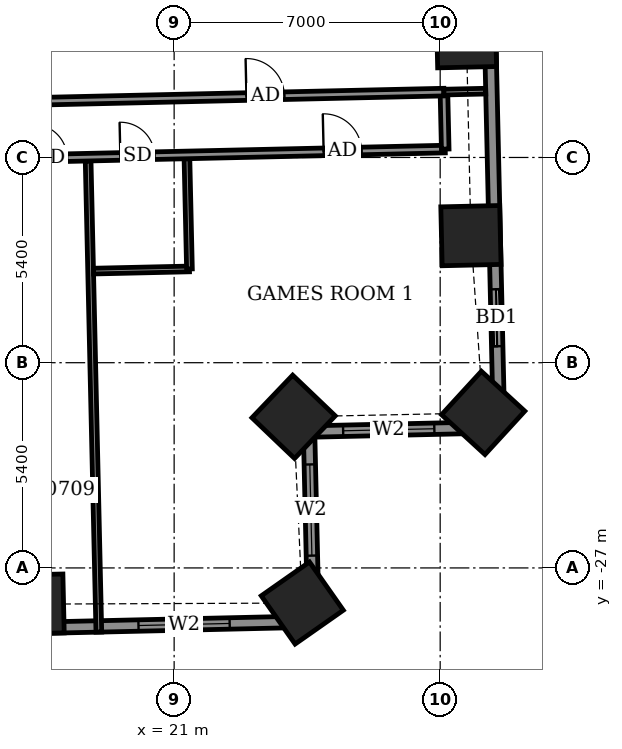
"""IFC4 building model, lengths in metres.
Left out: names, types, materials, properties, quantities, classifications, styles, units other than length and angle.
Written with IfcOpenShell. Run it as: python <this file> out.ifc"""

import sys

from ifc_helpers import new_model, si_unit, direction, frame, frame_2d, origin, origin_2d, place, context, subcontext, project, spatial, rectangle, extrude, element, fill, save


model = new_model("IFC4")
c1 = context("Model", 3, precision=1e-05, world=origin(), true_north=direction((0.0, 1.0)))
c2 = subcontext(c1, "Body", "Model", "MODEL_VIEW")
j1 = project(units=[si_unit("LENGTHUNIT", "METRE"), si_unit("PLANEANGLEUNIT", "RADIAN")], contexts=[c1])
p1 = place(None, origin())
s1 = spatial("IfcSite", under=j1, at=p1, CompositionType="ELEMENT")
p2 = place(p1, origin())
s2 = spatial("IfcBuilding", under=s1, at=p2, CompositionType="ELEMENT")
p3 = place(p2, frame((0.0, 0.0, 34.1)))
s3 = spatial("IfcBuildingStorey", under=s2, at=p3, CompositionType="ELEMENT", Elevation=34.1)
for number, where, z_axis, x_axis in (
    (1, (17.315, -27.952, -0.55), (0.0, 0.0, 1.0), (1.0, 0.023, 0.0)),
    (2, (24.372, -27.923, -0.55), (0.0, 0.0, 1.0), (0.819, 0.574, 0.0)),
    (3, (24.144, -23.024, -0.55), (0.0, 0.0, 1.0), (0.691, 0.723, 0.0)),
    (4, (29.132, -22.921, -0.55), (0.0, 0.0, 1.0), (0.676, 0.737, 0.0)),
    (5, (28.809, -18.257, -0.55), (0.0, 0.0, 1.0), (-0.023, 1.0, 0.0)),
    (6, (28.691, -13.05, -0.55), (0.0, 0.0, 1.0), (-0.023, 1.0, 0.0)),
):
    element("IfcColumn", number, at=place(p3, frame(where, z_axis=z_axis, x_axis=x_axis)), inside=s3, PredefinedType="COLUMN", context=c2, shape_type="SweptSolid", body=[
        extrude(rectangle(XDim=1.55, YDim=1.55, at=origin_2d()), origin(), (0.0, 0.0, 1.0), 3.6),
    ])
p4 = place(p3, frame((29.549, -23.299, 0.0), z_axis=(0.0, 0.0, 1.0), x_axis=(-0.022670336976, 0.999742994885, 0.0)))
e7 = element("IfcWall", 7, at=p4, inside=s3, PredefinedType="SOLIDWALL", context=c2, shape_type="SweptSolid", body=[
    extrude(rectangle(XDim=15.529, YDim=0.3, at=frame_2d((7.765, 0.0))), origin(), (0.0, 0.0, 1.0), 3.05),
])
p5 = place(p4, frame((2.133, 0.0, 0.0)))
e8 = element("IfcOpeningElement", 8, at=p5, cuts=e7, PredefinedType="OPENING", context=c2, shape_type="SweptSolid", body=[
    extrude(rectangle(XDim=1.5, YDim=2.4, at=frame_2d((0.75, 1.2))), frame((0.0, 0.16, 0.0), z_axis=(0.0, -1.0, 0.0), x_axis=(1.0, 0.0, 0.0)), (0.0, 0.0, 1.0), 0.32),
])
p6 = place(p4, frame((11.67, 0.0, 0.9)))
e9 = element("IfcOpeningElement", 9, at=p6, cuts=e7, PredefinedType="OPENING", context=c2, shape_type="SweptSolid", body=[
    extrude(rectangle(XDim=2.4, YDim=1.5, at=frame_2d((1.2, 0.75))), frame((0.0, 0.16, 0.0), z_axis=(0.0, -1.0, 0.0), x_axis=(1.0, 0.0, 0.0)), (0.0, 0.0, 1.0), 0.32),
])
p7 = place(p3, frame((-27.423, -29.593, 0.0), z_axis=(0.0, 0.0, 1.0), x_axis=(0.999742563204, 0.022689365739, 0.0)))
e10 = element("IfcWall", 10, at=p7, inside=s3, PredefinedType="SOLIDWALL", context=c2, shape_type="SweptSolid", body=[
    extrude(rectangle(XDim=52.101, YDim=0.3, at=frame_2d((26.05, 0.0))), origin(), (0.0, 0.0, 1.0), 3.05),
])
p8 = place(p7, frame((2.517, 0.0, 0.0)))
e11 = element("IfcOpeningElement", 11, at=p8, cuts=e10, PredefinedType="OPENING", context=c2, shape_type="SweptSolid", body=[
    extrude(rectangle(XDim=1.5, YDim=2.4, at=frame_2d((0.75, 1.2))), frame((0.0, 0.16, 0.0), z_axis=(0.0, -1.0, 0.0), x_axis=(1.0, 0.0, 0.0)), (0.0, 0.0, 1.0), 0.32),
])
p9 = place(p7, frame((8.356, 0.0, 0.0)))
e12 = element("IfcOpeningElement", 12, at=p9, cuts=e10, PredefinedType="OPENING", context=c2, shape_type="SweptSolid", body=[
    extrude(rectangle(XDim=1.2, YDim=2.4, at=frame_2d((0.6, 1.2))), frame((0.0, 0.16, 0.0), z_axis=(0.0, -1.0, 0.0), x_axis=(1.0, 0.0, 0.0)), (0.0, 0.0, 1.0), 0.32),
])
p10 = place(p7, frame((11.423, 0.0, 0.0)))
e13 = element("IfcOpeningElement", 13, at=p10, cuts=e10, PredefinedType="OPENING", context=c2, shape_type="SweptSolid", body=[
    extrude(rectangle(XDim=1.5, YDim=2.4, at=frame_2d((0.75, 1.2))), frame((0.0, 0.16, 0.0), z_axis=(0.0, -1.0, 0.0), x_axis=(1.0, 0.0, 0.0)), (0.0, 0.0, 1.0), 0.32),
])
p11 = place(p7, frame((16.373, 0.0, 0.0)))
e14 = element("IfcOpeningElement", 14, at=p11, cuts=e10, PredefinedType="OPENING", context=c2, shape_type="SweptSolid", body=[
    extrude(rectangle(XDim=1.5, YDim=2.4, at=frame_2d((0.75, 1.2))), frame((0.0, 0.16, 0.0), z_axis=(0.0, -1.0, 0.0), x_axis=(1.0, 0.0, 0.0)), (0.0, 0.0, 1.0), 0.32),
])
p12 = place(p7, frame((19.591, 0.0, 0.0)))
e15 = element("IfcOpeningElement", 15, at=p12, cuts=e10, PredefinedType="OPENING", context=c2, shape_type="SweptSolid", body=[
    extrude(rectangle(XDim=1.5, YDim=2.4, at=frame_2d((0.75, 1.2))), frame((0.0, 0.16, 0.0), z_axis=(0.0, -1.0, 0.0), x_axis=(1.0, 0.0, 0.0)), (0.0, 0.0, 1.0), 0.32),
])
p13 = place(p7, frame((25.2, 0.0, 0.0)))
e16 = element("IfcOpeningElement", 16, at=p13, cuts=e10, PredefinedType="OPENING", context=c2, shape_type="SweptSolid", body=[
    extrude(rectangle(XDim=1.5, YDim=2.4, at=frame_2d((0.75, 1.2))), frame((0.0, 0.16, 0.0), z_axis=(0.0, -1.0, 0.0), x_axis=(1.0, 0.0, 0.0)), (0.0, 0.0, 1.0), 0.32),
])
p14 = place(p7, frame((30.909, 0.0, 0.0)))
e17 = element("IfcOpeningElement", 17, at=p14, cuts=e10, PredefinedType="OPENING", context=c2, shape_type="SweptSolid", body=[
    extrude(rectangle(XDim=1.5, YDim=2.4, at=frame_2d((0.75, 1.2))), frame((0.0, 0.16, 0.0), z_axis=(0.0, -1.0, 0.0), x_axis=(1.0, 0.0, 0.0)), (0.0, 0.0, 1.0), 0.32),
])
p15 = place(p7, frame((34.127, 0.0, 0.0)))
e18 = element("IfcOpeningElement", 18, at=p15, cuts=e10, PredefinedType="OPENING", context=c2, shape_type="SweptSolid", body=[
    extrude(rectangle(XDim=1.5, YDim=2.4, at=frame_2d((0.75, 1.2))), frame((0.0, 0.16, 0.0), z_axis=(0.0, -1.0, 0.0), x_axis=(1.0, 0.0, 0.0)), (0.0, 0.0, 1.0), 0.32),
])
p16 = place(p7, frame((39.177, 0.0, 0.0)))
e19 = element("IfcOpeningElement", 19, at=p16, cuts=e10, PredefinedType="OPENING", context=c2, shape_type="SweptSolid", body=[
    extrude(rectangle(XDim=1.5, YDim=2.4, at=frame_2d((0.75, 1.2))), frame((0.0, 0.16, 0.0), z_axis=(0.0, -1.0, 0.0), x_axis=(1.0, 0.0, 0.0)), (0.0, 0.0, 1.0), 0.32),
])
p17 = place(p7, frame((42.544, 0.0, 0.0)))
e20 = element("IfcOpeningElement", 20, at=p17, cuts=e10, PredefinedType="OPENING", context=c2, shape_type="SweptSolid", body=[
    extrude(rectangle(XDim=1.2, YDim=2.4, at=frame_2d((0.6, 1.2))), frame((0.0, 0.16, 0.0), z_axis=(0.0, -1.0, 0.0), x_axis=(1.0, 0.0, 0.0)), (0.0, 0.0, 1.0), 0.32),
])
p18 = place(p7, frame((47.497, 0.0, 0.9)))
e21 = element("IfcOpeningElement", 21, at=p18, cuts=e10, PredefinedType="OPENING", context=c2, shape_type="SweptSolid", body=[
    extrude(rectangle(XDim=2.4, YDim=1.5, at=frame_2d((1.2, 0.75))), frame((0.0, 0.16, 0.0), z_axis=(0.0, -1.0, 0.0), x_axis=(1.0, 0.0, 0.0)), (0.0, 0.0, 1.0), 0.32),
])
p19 = place(p3, frame((24.664, -28.411, 0.0), z_axis=(0.0, 0.0, 1.0), x_axis=(-0.022802372469, 0.999739992103, 0.0)))
e22 = element("IfcWall", 22, at=p19, inside=s3, PredefinedType="SOLIDWALL", context=c2, shape_type="SweptSolid", body=[
    extrude(rectangle(XDim=5.0, YDim=0.3, at=frame_2d((2.5, 0.0))), origin(), (0.0, 0.0, 1.0), 2.55),
])
p20 = place(p19, frame((1.735, 0.0, 0.9)))
e23 = element("IfcOpeningElement", 23, at=p20, cuts=e22, PredefinedType="OPENING", context=c2, shape_type="SweptSolid", body=[
    extrude(rectangle(XDim=2.4, YDim=1.5, at=frame_2d((1.2, 0.75))), frame((0.0, 0.16, 0.0), z_axis=(0.0, -1.0, 0.0), x_axis=(1.0, 0.0, 0.0)), (0.0, 0.0, 1.0), 0.32),
])
p21 = place(p3, frame((24.55, -23.412, 0.0), z_axis=(0.0, 0.0, 1.0), x_axis=(0.999744450377, 0.022606059803, 0.0)))
e24 = element("IfcWall", 24, at=p21, inside=s3, PredefinedType="SOLIDWALL", context=c2, shape_type="SweptSolid", body=[
    extrude(rectangle(XDim=5.0, YDim=0.3, at=frame_2d((2.5, 0.0))), origin(), (0.0, 0.0, 1.0), 3.05),
])
p22 = place(p21, frame((0.897, 0.0, 0.9)))
e25 = element("IfcOpeningElement", 25, at=p22, cuts=e24, PredefinedType="OPENING", context=c2, shape_type="SweptSolid", body=[
    extrude(rectangle(XDim=2.4, YDim=1.5, at=frame_2d((1.2, 0.75))), frame((0.0, 0.16, 0.0), z_axis=(0.0, -1.0, 0.0), x_axis=(1.0, 0.0, 0.0)), (0.0, 0.0, 1.0), 0.32),
])
p23 = place(p3, frame((30.832, -15.918, 0.0), z_axis=(0.0, 0.0, 1.0), x_axis=(-0.022828630714, 0.999739392852, 0.0)))
e26 = element("IfcWall", 26, at=p23, inside=s3, PredefinedType="USERDEFINED", context=c2, shape_type="SweptSolid", body=[
    extrude(rectangle(XDim=6.0, YDim=0.55, at=frame_2d((3.0, 0.0))), origin(), (0.0, 0.0, 1.0), 0.8),
])
p24 = place(p3, frame((19.048, -29.988, 0.0), z_axis=(0.0, 0.0, 1.0), x_axis=(0.999744436995, 0.02260665162, 0.0)))
e27 = element("IfcWall", 27, at=p24, inside=s3, PredefinedType="USERDEFINED", context=c2, shape_type="SweptSolid", body=[
    extrude(rectangle(XDim=5.799, YDim=0.55, at=frame_2d((2.9, 0.0))), origin(), (0.0, 0.0, 1.0), 0.8),
])
p25 = place(p3, frame((19.019, -28.689, 0.0), z_axis=(0.0, 0.0, 1.0), x_axis=(-0.022740189192, 0.999741408463, 0.0)))
e28 = element("IfcWall", 28, at=p25, inside=s3, PredefinedType="PARTITIONING", context=c2, shape_type="SweptSolid", body=[
    extrude(rectangle(XDim=12.4, YDim=0.15, at=frame_2d((6.2, 0.0))), origin(), (0.0, 0.0, 1.0), 2.55),
])
p26 = place(p3, frame((18.878, -19.19, 0.0), z_axis=(0.0, 0.0, 1.0), x_axis=(0.999746356616, 0.022521599255, 0.0)))
e29 = element("IfcWall", 29, at=p26, inside=s3, PredefinedType="PARTITIONING", context=c2, shape_type="SweptSolid", body=[
    extrude(rectangle(XDim=2.526, YDim=0.15, at=frame_2d((1.263, 0.0))), origin(), (0.0, 0.0, 1.0), 3.05),
])
p27 = place(p3, frame((21.403, -19.133, 0.0), z_axis=(0.0, 0.0, 1.0), x_axis=(-0.022807433839, 0.999739876649, 0.0)))
e30 = element("IfcWall", 30, at=p27, inside=s3, PredefinedType="PARTITIONING", context=c2, shape_type="SweptSolid", body=[
    extrude(rectangle(XDim=2.901, YDim=0.15, at=frame_2d((1.45, 0.0))), origin(), (0.0, 0.0, 1.0), 3.05),
])
p28 = place(p3, frame((-30.652, -17.313, 0.0), z_axis=(0.0, 0.0, 1.0), x_axis=(0.999742623764, 0.02268669719, 0.0)))
e31 = element("IfcWall", 31, at=p28, inside=s3, PredefinedType="PARTITIONING", context=c2, shape_type="SweptSolid", body=[
    extrude(rectangle(XDim=58.8, YDim=0.2, at=frame_2d((29.4, 0.0))), origin(), (0.0, 0.0, 1.0), 3.05),
])
p29 = place(p28, frame((3.406, 0.0, 0.0)))
e32 = element("IfcOpeningElement", 32, at=p29, cuts=e31, PredefinedType="OPENING", context=c2, shape_type="SweptSolid", body=[
    extrude(rectangle(XDim=1.0, YDim=2.1, at=frame_2d((0.5, 1.05))), frame((0.0, 0.11, 0.0), z_axis=(0.0, -1.0, 0.0), x_axis=(1.0, 0.0, 0.0)), (0.0, 0.0, 1.0), 0.22),
])
p30 = place(p28, frame((11.475, 0.0, 0.0)))
e33 = element("IfcOpeningElement", 33, at=p30, cuts=e31, PredefinedType="OPENING", context=c2, shape_type="SweptSolid", body=[
    extrude(rectangle(XDim=0.9, YDim=2.1, at=frame_2d((0.45, 1.05))), frame((0.0, 0.11, 0.0), z_axis=(0.0, -1.0, 0.0), x_axis=(1.0, 0.0, 0.0)), (0.0, 0.0, 1.0), 0.22),
])
p31 = place(p28, frame((13.55, 0.0, 0.0)))
e34 = element("IfcOpeningElement", 34, at=p31, cuts=e31, PredefinedType="OPENING", context=c2, shape_type="SweptSolid", body=[
    extrude(rectangle(XDim=0.9, YDim=2.1, at=frame_2d((0.45, 1.05))), frame((0.0, 0.11, 0.0), z_axis=(0.0, -1.0, 0.0), x_axis=(1.0, 0.0, 0.0)), (0.0, 0.0, 1.0), 0.22),
])
p32 = place(p28, frame((20.375, 0.0, 0.0)))
e35 = element("IfcOpeningElement", 35, at=p32, cuts=e31, PredefinedType="OPENING", context=c2, shape_type="SweptSolid", body=[
    extrude(rectangle(XDim=0.9, YDim=2.1, at=frame_2d((0.45, 1.05))), frame((0.0, 0.11, 0.0), z_axis=(0.0, -1.0, 0.0), x_axis=(1.0, 0.0, 0.0)), (0.0, 0.0, 1.0), 0.22),
])
p33 = place(p28, frame((22.625, 0.0, 0.0)))
e36 = element("IfcOpeningElement", 36, at=p33, cuts=e31, PredefinedType="OPENING", context=c2, shape_type="SweptSolid", body=[
    extrude(rectangle(XDim=0.9, YDim=2.1, at=frame_2d((0.45, 1.05))), frame((0.0, 0.11, 0.0), z_axis=(0.0, -1.0, 0.0), x_axis=(1.0, 0.0, 0.0)), (0.0, 0.0, 1.0), 0.22),
])
p34 = place(p28, frame((29.65, 0.0, 0.0)))
e37 = element("IfcOpeningElement", 37, at=p34, cuts=e31, PredefinedType="OPENING", context=c2, shape_type="SweptSolid", body=[
    extrude(rectangle(XDim=0.9, YDim=2.1, at=frame_2d((0.45, 1.05))), frame((0.0, 0.11, 0.0), z_axis=(0.0, -1.0, 0.0), x_axis=(1.0, 0.0, 0.0)), (0.0, 0.0, 1.0), 0.22),
])
p35 = place(p28, frame((31.875, 0.0, 0.0)))
e38 = element("IfcOpeningElement", 38, at=p35, cuts=e31, PredefinedType="OPENING", context=c2, shape_type="SweptSolid", body=[
    extrude(rectangle(XDim=0.9, YDim=2.1, at=frame_2d((0.45, 1.05))), frame((0.0, 0.11, 0.0), z_axis=(0.0, -1.0, 0.0), x_axis=(1.0, 0.0, 0.0)), (0.0, 0.0, 1.0), 0.22),
])
p36 = place(p28, frame((38.9, 0.0, 0.0)))
e39 = element("IfcOpeningElement", 39, at=p36, cuts=e31, PredefinedType="OPENING", context=c2, shape_type="SweptSolid", body=[
    extrude(rectangle(XDim=0.9, YDim=2.1, at=frame_2d((0.45, 1.05))), frame((0.0, 0.11, 0.0), z_axis=(0.0, -1.0, 0.0), x_axis=(1.0, 0.0, 0.0)), (0.0, 0.0, 1.0), 0.22),
])
p37 = place(p28, frame((41.025, 0.0, 0.0)))
e40 = element("IfcOpeningElement", 40, at=p37, cuts=e31, PredefinedType="OPENING", context=c2, shape_type="SweptSolid", body=[
    extrude(rectangle(XDim=0.9, YDim=2.1, at=frame_2d((0.45, 1.05))), frame((0.0, 0.11, 0.0), z_axis=(0.0, -1.0, 0.0), x_axis=(1.0, 0.0, 0.0)), (0.0, 0.0, 1.0), 0.22),
])
p38 = place(p28, frame((47.95, 0.0, 0.0)))
e41 = element("IfcOpeningElement", 41, at=p38, cuts=e31, PredefinedType="OPENING", context=c2, shape_type="SweptSolid", body=[
    extrude(rectangle(XDim=0.9, YDim=2.1, at=frame_2d((0.45, 1.05))), frame((0.0, 0.11, 0.0), z_axis=(0.0, -1.0, 0.0), x_axis=(1.0, 0.0, 0.0)), (0.0, 0.0, 1.0), 0.22),
])
p39 = place(p28, frame((55.6, 0.0, 0.0)))
e42 = element("IfcOpeningElement", 42, at=p39, cuts=e31, PredefinedType="OPENING", context=c2, shape_type="SweptSolid", body=[
    extrude(rectangle(XDim=1.0, YDim=2.1, at=frame_2d((0.5, 1.05))), frame((0.0, 0.11, 0.0), z_axis=(0.0, -1.0, 0.0), x_axis=(1.0, 0.0, 0.0)), (0.0, 0.0, 1.0), 0.22),
])
p40 = place(p28, frame((50.25, 0.0, 0.0)))
e43 = element("IfcOpeningElement", 43, at=p40, cuts=e31, PredefinedType="OPENING", context=c2, shape_type="SweptSolid", body=[
    extrude(rectangle(XDim=0.9, YDim=2.1, at=frame_2d((0.45, 1.05))), frame((0.0, 0.11, 0.0), z_axis=(0.0, -1.0, 0.0), x_axis=(1.0, 0.0, 0.0)), (0.0, 0.0, 1.0), 0.22),
])
p41 = place(p3, frame((28.133, -15.979, 0.0), z_axis=(0.0, 0.0, 1.0), x_axis=(-0.022632637625, 0.99974384905, 0.0)))
e44 = element("IfcWall", 44, at=p41, inside=s3, PredefinedType="PARTITIONING", context=c2, shape_type="SweptSolid", body=[
    extrude(rectangle(XDim=1.5, YDim=0.2, at=frame_2d((0.75, 0.0))), origin(), (0.0, 0.0, 1.0), 3.05),
])
p42 = place(p3, frame((17.306, -14.724, 0.0), z_axis=(0.0, 0.0, 1.0), x_axis=(0.999744269809, 0.022614043969, 0.0)))
e45 = element("IfcWall", 45, at=p42, inside=s3, PredefinedType="PARTITIONING", context=c2, shape_type="SweptSolid", body=[
    extrude(rectangle(XDim=10.796, YDim=0.2, at=frame_2d((5.398, 0.0))), origin(), (0.0, 0.0, 1.0), 3.05),
])
p43 = place(p42, frame((5.598, 0.0, 0.0)))
e46 = element("IfcOpeningElement", 46, at=p43, cuts=e45, PredefinedType="OPENING", context=c2, shape_type="SweptSolid", body=[
    extrude(rectangle(XDim=1.0, YDim=2.1, at=frame_2d((0.5, 1.05))), frame((0.0, 0.11, 0.0), z_axis=(0.0, -1.0, 0.0), x_axis=(1.0, 0.0, 0.0)), (0.0, 0.0, 1.0), 0.22),
])
p44 = place(p3, frame((28.095, -14.48, 0.0), z_axis=(0.0, 0.0, 1.0), x_axis=(0.999745251335, 0.022570609924, 0.0)))
e47 = element("IfcWall", 47, at=p44, inside=s3, PredefinedType="PARTITIONING", context=c2, shape_type="SweptSolid", body=[
    extrude(rectangle(XDim=1.103, YDim=0.15, at=frame_2d((0.552, 0.0))), origin(), (0.0, 0.0, 1.0), 2.55),
])
p45 = place(p5, origin())
e48 = element("IfcDoor", 48, at=p45, inside=s3, OperationType="SLIDING_TO_LEFT", PredefinedType="DOOR", context=c2, shape_type="SweptSolid", body=[
    extrude(rectangle(XDim=1.5, YDim=2.4, at=frame_2d((0.75, 1.2))), frame((0.0, 0.025, 0.0), z_axis=(0.0, -1.0, 0.0), x_axis=(1.0, 0.0, 0.0)), (0.0, 0.0, 1.0), 0.05),
])
fill(e8, e48)
p46 = place(p18, origin())
e49 = element("IfcWindow", 49, at=p46, inside=s3, PartitioningType="DOUBLE_PANEL_VERTICAL", PredefinedType="WINDOW", context=c2, shape_type="SweptSolid", body=[
    extrude(rectangle(XDim=2.4, YDim=1.5, at=frame_2d((1.2, 0.75))), frame((0.0, 0.03, 0.0), z_axis=(0.0, -1.0, 0.0), x_axis=(1.0, 0.0, 0.0)), (0.0, 0.0, 1.0), 0.06),
])
fill(e21, e49)
p47 = place(p20, origin())
e50 = element("IfcWindow", 50, at=p47, inside=s3, PartitioningType="DOUBLE_PANEL_VERTICAL", PredefinedType="WINDOW", context=c2, shape_type="SweptSolid", body=[
    extrude(rectangle(XDim=2.4, YDim=1.5, at=frame_2d((1.2, 0.75))), frame((0.0, 0.03, 0.0), z_axis=(0.0, -1.0, 0.0), x_axis=(1.0, 0.0, 0.0)), (0.0, 0.0, 1.0), 0.06),
])
fill(e23, e50)
p48 = place(p22, origin())
e51 = element("IfcWindow", 51, at=p48, inside=s3, PartitioningType="DOUBLE_PANEL_VERTICAL", PredefinedType="WINDOW", context=c2, shape_type="SweptSolid", body=[
    extrude(rectangle(XDim=2.4, YDim=1.5, at=frame_2d((1.2, 0.75))), frame((0.0, 0.03, 0.0), z_axis=(0.0, -1.0, 0.0), x_axis=(1.0, 0.0, 0.0)), (0.0, 0.0, 1.0), 0.06),
])
fill(e25, e51)
p49 = place(p38, origin())
e52 = element("IfcDoor", 52, at=p49, inside=s3, OperationType="SINGLE_SWING_LEFT", PredefinedType="DOOR", context=c2, shape_type="SweptSolid", body=[
    extrude(rectangle(XDim=0.9, YDim=2.1, at=frame_2d((0.45, 1.05))), frame((0.0, 0.025, 0.0), z_axis=(0.0, -1.0, 0.0), x_axis=(1.0, 0.0, 0.0)), (0.0, 0.0, 1.0), 0.05),
])
fill(e41, e52)
p50 = place(p39, origin())
e53 = element("IfcDoor", 53, at=p50, inside=s3, OperationType="SINGLE_SWING_RIGHT", PredefinedType="DOOR", context=c2, shape_type="SweptSolid", body=[
    extrude(rectangle(XDim=1.0, YDim=2.1, at=frame_2d((0.5, 1.05))), frame((0.0, 0.025, 0.0), z_axis=(0.0, -1.0, 0.0), x_axis=(1.0, 0.0, 0.0)), (0.0, 0.0, 1.0), 0.05),
])
fill(e42, e53)
p51 = place(p40, origin())
e54 = element("IfcDoor", 54, at=p51, inside=s3, OperationType="SINGLE_SWING_LEFT", PredefinedType="DOOR", context=c2, shape_type="SweptSolid", body=[
    extrude(rectangle(XDim=0.9, YDim=2.1, at=frame_2d((0.45, 1.05))), frame((0.0, 0.025, 0.0), z_axis=(0.0, -1.0, 0.0), x_axis=(1.0, 0.0, 0.0)), (0.0, 0.0, 1.0), 0.05),
])
fill(e43, e54)
p52 = place(p43, origin())
e55 = element("IfcDoor", 55, at=p52, inside=s3, OperationType="SINGLE_SWING_LEFT", PredefinedType="DOOR", context=c2, shape_type="SweptSolid", body=[
    extrude(rectangle(XDim=1.0, YDim=2.1, at=frame_2d((0.5, 1.05))), frame((0.0, 0.025, 0.0), z_axis=(0.0, -1.0, 0.0), x_axis=(1.0, 0.0, 0.0)), (0.0, 0.0, 1.0), 0.05),
])
fill(e46, e55)
save(model, sys.argv[1])
